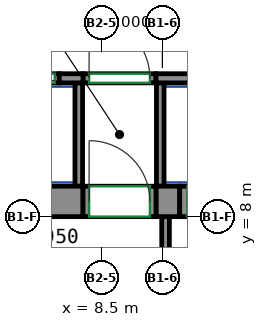
"""IFC4 building model, lengths in metres.
Left out: names, types, materials, properties, quantities, classifications, styles, units other than length and angle.
Written with IfcOpenShell. Run it as: python <this file> out.ifc"""

import sys

from ifc_helpers import new_model, si_unit, direction, frame, frame_2d, origin, place, context, subcontext, project, spatial, rectangle, extrude, source, transform, mapped, element, fill, save


model = new_model("IFC4")
c1 = context("Model", 3, precision=1e-05, world=origin(), true_north=direction((0.0, 1.0)))
c2 = subcontext(c1, "Body", "Model", "MODEL_VIEW")
j1 = project(units=[si_unit("LENGTHUNIT", "METRE"), si_unit("PLANEANGLEUNIT", "RADIAN")], contexts=[c1])
p1 = place(None, origin())
s1 = spatial("IfcSite", under=j1, at=p1, CompositionType="ELEMENT")
p2 = place(p1, origin())
s2 = spatial("IfcBuilding", under=s1, at=p2, CompositionType="ELEMENT")
p3 = place(p2, frame((0.0, 0.0, 13.5)))
s3 = spatial("IfcBuildingStorey", under=s2, at=p3, CompositionType="ELEMENT", Elevation=13.5)
m1 = source(origin(), c2, "Body", "SweptSolid", [
    extrude(rectangle(XDim=14.18, YDim=1.0, at=frame_2d((7.09, 0.0))), origin(), (0.0, 0.0, 1.0), 4.1),
])
p4 = place(p3, frame((-6.29, 8.5, 0.0), z_axis=(0.0, 0.0, 1.0), x_axis=(1.0, 0.0, 0.0)))
e1 = element("IfcWall", 1, at=p4, inside=s3, PredefinedType="SHEAR", context=c2, shape_type="MappedRepresentation", body=[
    mapped(m1, transform((0.0, 0.0, 0.0))),
])
m2 = source(origin(), c2, "Body", "SweptSolid", [
    extrude(rectangle(XDim=0.78, YDim=1.0, at=frame_2d((0.39, 0.0))), origin(), (0.0, 0.0, 1.0), 4.1),
])
p5 = place(p3, frame((10.29, 8.5, 0.0), z_axis=(0.0, 0.0, 1.0), x_axis=(1.0, 0.0, 0.0)))
e2 = element("IfcWall", 2, at=p5, inside=s3, PredefinedType="SHEAR", context=c2, shape_type="MappedRepresentation", body=[
    mapped(m2, transform((0.0, 0.0, 0.0))),
])
m3 = source(origin(), c2, "Body", "SweptSolid", [
    extrude(rectangle(XDim=0.78, YDim=0.3, at=frame_2d((0.39, 0.0))), origin(), (0.0, 0.0, 1.0), 4.1),
])
p6 = place(p3, frame((7.11, 12.55, 0.0), z_axis=(0.0, 0.0, 1.0), x_axis=(1.0, 0.0, 0.0)))
e3 = element("IfcWall", 3, at=p6, inside=s3, PredefinedType="SHEAR", context=c2, shape_type="MappedRepresentation", body=[
    mapped(m3, transform((0.0, 0.0, 0.0))),
])
m4 = source(origin(), c2, "Body", "SweptSolid", [
    extrude(rectangle(XDim=2.82, YDim=0.3, at=frame_2d((1.41, 0.0))), origin(), (0.0, 0.0, 1.0), 4.1),
])
p7 = place(p3, frame((10.29, 12.55, 0.0), z_axis=(0.0, 0.0, 1.0), x_axis=(1.0, 0.0, 0.0)))
e4 = element("IfcWall", 4, at=p7, inside=s3, PredefinedType="SHEAR", context=c2, shape_type="MappedRepresentation", body=[
    mapped(m4, transform((0.0, 0.0, 0.0))),
])
m5 = source(origin(), c2, "Body", "SweptSolid", [
    extrude(rectangle(XDim=1.4, YDim=0.3, at=frame_2d((0.7, 0.0))), origin(), (0.0, 0.0, 1.0), 4.1),
])
p8 = place(p3, frame((5.71, 12.55, 0.0), z_axis=(0.0, 0.0, 1.0), x_axis=(1.0, 0.0, 0.0)))
e5 = element("IfcWall", 5, at=p8, inside=s3, PredefinedType="PARTITIONING", context=c2, shape_type="MappedRepresentation", body=[
    mapped(m5, transform((0.0, 0.0, 0.0))),
])
p9 = place(p8, frame((0.15, 0.0, 0.0)))
e6 = element("IfcOpeningElement", 6, at=p9, cuts=e5, PredefinedType="OPENING", context=c2, shape_type="SweptSolid", body=[
    extrude(rectangle(XDim=1.1, YDim=2.1, at=frame_2d((0.55, 1.05))), frame((0.0, 0.16, 0.0), z_axis=(0.0, -1.0, 0.0), x_axis=(1.0, 0.0, 0.0)), (0.0, 0.0, 1.0), 0.32),
])
m6 = source(origin(), c2, "Body", "SweptSolid", [
    extrude(rectangle(XDim=2.4, YDim=0.3, at=frame_2d((1.2, 0.0))), origin(), (0.0, 0.0, 1.0), 4.1),
])
p10 = place(p3, frame((7.89, 12.55, 0.0), z_axis=(0.0, 0.0, 1.0), x_axis=(1.0, 0.0, 0.0)))
e7 = element("IfcWall", 7, at=p10, inside=s3, PredefinedType="PARTITIONING", context=c2, shape_type="MappedRepresentation", body=[
    mapped(m6, transform((0.0, 0.0, 0.0))),
])
p11 = place(p10, frame((0.2, 0.0, 0.0)))
e8 = element("IfcOpeningElement", 8, at=p11, cuts=e7, PredefinedType="OPENING", context=c2, shape_type="SweptSolid", body=[
    extrude(rectangle(XDim=2.0, YDim=2.1, at=frame_2d((1.0, 1.05))), frame((0.0, 0.16, 0.0), z_axis=(0.0, -1.0, 0.0), x_axis=(1.0, 0.0, 0.0)), (0.0, 0.0, 1.0), 0.32),
])
m7 = source(origin(), c2, "Body", "SweptSolid", [
    extrude(rectangle(XDim=2.65, YDim=0.25, at=frame_2d((1.325, 0.0))), origin(), (0.0, 0.0, 1.0), 4.1),
])
p12 = place(p3, frame((10.605, 5.35, 0.0), z_axis=(0.0, 0.0, 1.0), x_axis=(0.0, 1.0, 0.0)))
e9 = element("IfcWall", 9, at=p12, inside=s3, PredefinedType="PARTITIONING", context=c2, shape_type="MappedRepresentation", body=[
    mapped(m7, transform((0.0, 0.0, 0.0))),
])
m8 = source(origin(), c2, "Body", "SweptSolid", [
    extrude(rectangle(XDim=3.4, YDim=0.25, at=frame_2d((1.7, 0.0))), origin(), (0.0, 0.0, 1.0), 4.1),
])
for number, where, z_axis, x_axis in (
    (10, (10.43, 9.0, 0.0), (0.0, 0.0, 1.0), (0.0, 1.0, 0.0)),
    (11, (7.75, 9.0, 0.0), (0.0, 0.0, 1.0), (0.0, 1.0, 0.0)),
):
    element("IfcWall", number, at=place(p3, frame(where, z_axis=z_axis, x_axis=x_axis)), inside=s3, PredefinedType="PARTITIONING", context=c2, shape_type="MappedRepresentation", body=[
        mapped(m8, transform((0.0, 0.0, 0.0))),
    ])
m9 = source(origin(), c2, "Body", "SweptSolid", [
    extrude(rectangle(XDim=2.4, YDim=1.0, at=frame_2d((1.2, 0.0))), origin(), (0.0, 0.0, 1.0), 2.7),
])
p13 = place(p3, frame((7.89, 8.5, 0.0), z_axis=(0.0, 0.0, 1.0), x_axis=(1.0, 0.0, 0.0)))
e12 = element("IfcWall", 12, at=p13, inside=s3, PredefinedType="PARTITIONING", context=c2, shape_type="MappedRepresentation", body=[
    mapped(m9, transform((0.0, 0.0, 0.0))),
])
p14 = place(p13, frame((0.2, 0.0, 0.0)))
e13 = element("IfcOpeningElement", 13, at=p14, cuts=e12, PredefinedType="OPENING", context=c2, shape_type="SweptSolid", body=[
    extrude(rectangle(XDim=2.0, YDim=2.1, at=frame_2d((1.0, 1.05))), frame((0.0, 0.51, 0.0), z_axis=(0.0, -1.0, 0.0), x_axis=(1.0, 0.0, 0.0)), (0.0, 0.0, 1.0), 1.02),
])
m10 = source(origin(), c2, "Body", "SweptSolid", [
    extrude(rectangle(XDim=1.4, YDim=1.0, at=frame_2d((0.7, 0.0))), origin(), (0.0, 0.0, 1.0), 2.7),
])
p15 = place(p3, frame((11.07, 8.5, 0.0), z_axis=(0.0, 0.0, 1.0), x_axis=(1.0, 0.0, 0.0)))
e14 = element("IfcWall", 14, at=p15, inside=s3, PredefinedType="PARTITIONING", context=c2, shape_type="MappedRepresentation", body=[
    mapped(m10, transform((0.0, 0.0, 0.0))),
])
p16 = place(p15, frame((0.25, 0.0, 0.0)))
e15 = element("IfcOpeningElement", 15, at=p16, cuts=e14, PredefinedType="OPENING", context=c2, shape_type="SweptSolid", body=[
    extrude(rectangle(XDim=0.9, YDim=2.1, at=frame_2d((0.45, 1.05))), frame((0.0, 0.51, 0.0), z_axis=(0.0, -1.0, 0.0), x_axis=(1.0, 0.0, 0.0)), (0.0, 0.0, 1.0), 1.02),
])
p17 = place(p11, origin())
e16 = element("IfcDoor", 16, at=p17, inside=s3, OperationType="DOUBLE_DOOR_SINGLE_SWING", PredefinedType="DOOR", context=c2, shape_type="SweptSolid", body=[
    extrude(rectangle(XDim=2.0, YDim=2.1, at=frame_2d((1.0, 1.05))), frame((0.0, 0.025, 0.0), z_axis=(0.0, -1.0, 0.0), x_axis=(1.0, 0.0, 0.0)), (0.0, 0.0, 1.0), 0.05),
])
fill(e8, e16)
p18 = place(p14, origin())
e17 = element("IfcDoor", 17, at=p18, inside=s3, OperationType="DOUBLE_DOOR_SINGLE_SWING", PredefinedType="DOOR", context=c2, shape_type="SweptSolid", body=[
    extrude(rectangle(XDim=2.0, YDim=2.1, at=frame_2d((1.0, 1.05))), frame((0.0, 0.405, 0.0), z_axis=(0.0, -1.0, 0.0), x_axis=(1.0, 0.0, 0.0)), (0.0, 0.0, 1.0), 0.05),
])
fill(e13, e17)
p19 = place(p9, origin())
e18 = element("IfcDoor", 18, at=p19, inside=s3, OperationType="DOUBLE_DOOR_SLIDING", PredefinedType="DOOR", context=c2, shape_type="SweptSolid", body=[
    extrude(rectangle(XDim=1.1, YDim=2.1, at=frame_2d((0.55, 1.05))), frame((0.0, 0.025, 0.0), z_axis=(0.0, -1.0, 0.0), x_axis=(1.0, 0.0, 0.0)), (0.0, 0.0, 1.0), 0.05),
])
fill(e6, e18)
save(model, sys.argv[1])
